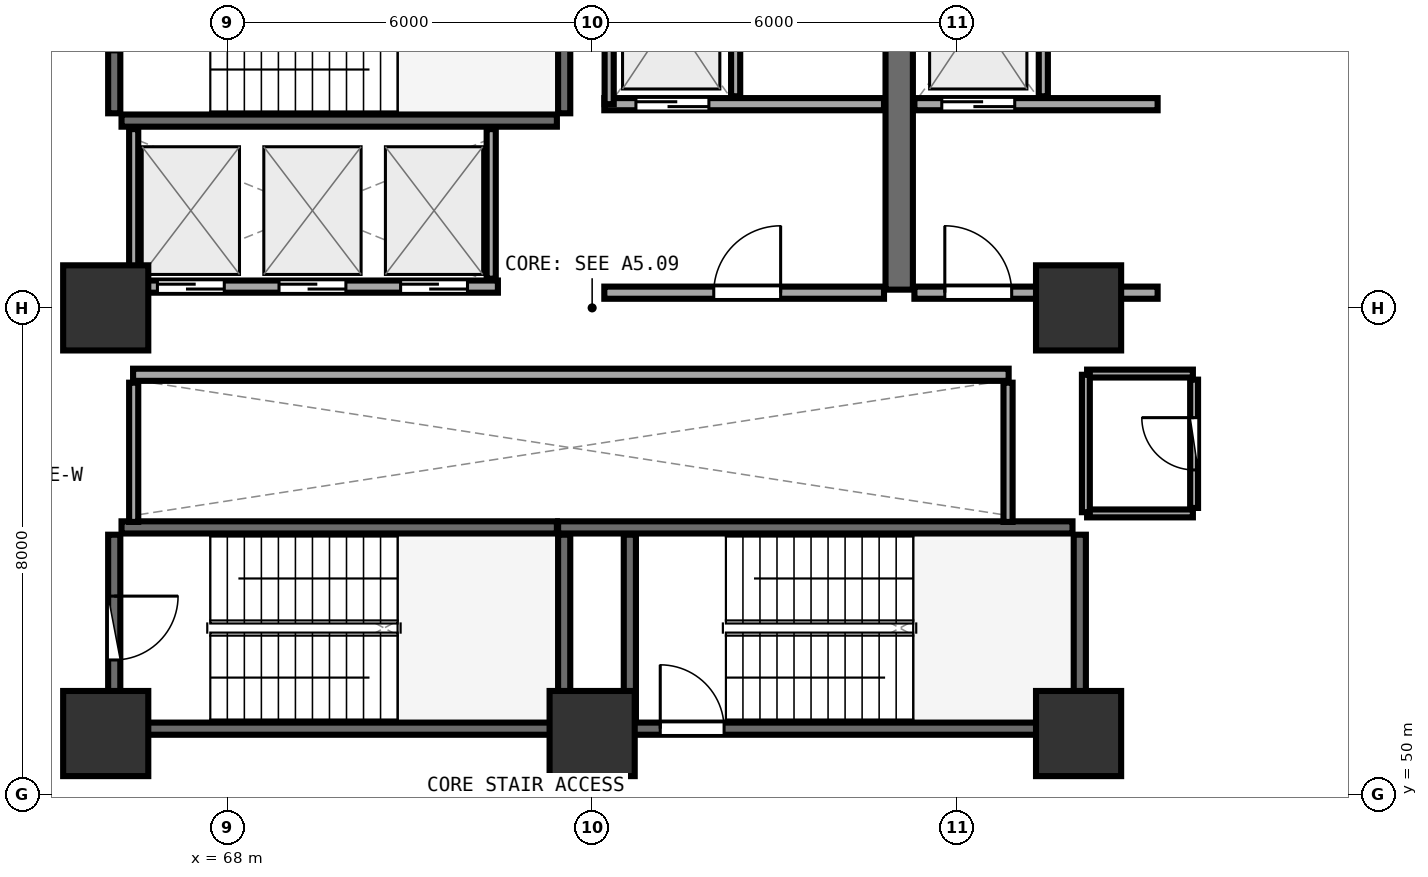
"""IFC4 building model, lengths in metres.
Left out: names, types, materials, properties, quantities, classifications, styles, units other than length and angle.
Written with IfcOpenShell. Run it as: python <this file> out.ifc"""

import sys

from ifc_helpers import new_model, si_unit, direction, frame, frame_2d, origin, origin_2d, place, context, subcontext, project, spatial, rectangle, extrude, element, fill, save


model = new_model("IFC4")
c1 = context("Model", 3, precision=1e-05, world=origin(), true_north=direction((0.0, 1.0)))
c2 = subcontext(c1, "Body", "Model", "MODEL_VIEW")
j1 = project(units=[si_unit("LENGTHUNIT", "METRE"), si_unit("PLANEANGLEUNIT", "RADIAN")], contexts=[c1])
p1 = place(None, origin())
s1 = spatial("IfcSite", under=j1, at=p1, CompositionType="ELEMENT")
p2 = place(p1, origin())
s2 = spatial("IfcBuilding", under=s1, at=p2, CompositionType="ELEMENT")
p3 = place(p2, frame((0.0, 0.0, 72.26)))
s3 = spatial("IfcBuildingStorey", under=s2, at=p3, CompositionType="ELEMENT", Elevation=72.26)
for number, where, z_axis, x_axis in (
    (1, (66.0, 51.0, 0.0), (0.0, 0.0, 1.0), (1.0, 0.0, 0.0)),
    (2, (74.0, 51.0, 0.0), (0.0, 0.0, 1.0), (1.0, 0.0, 0.0)),
    (3, (82.0, 51.0, 0.0), (0.0, 0.0, 1.0), (1.0, 0.0, 0.0)),
    (4, (82.0, 58.0, 0.0), (0.0, 0.0, 1.0), (1.0, 0.0, 0.0)),
    (5, (66.0, 58.0, 0.0), (0.0, 0.0, 1.0), (1.0, 0.0, 0.0)),
):
    element("IfcColumn", number, at=place(p3, frame(where, z_axis=z_axis, x_axis=x_axis)), inside=s3, PredefinedType="PILASTER", context=c2, shape_type="SweptSolid", body=[
        extrude(rectangle(XDim=1.4, YDim=1.4, at=origin_2d()), origin(), (0.0, 0.0, 1.0), 4.09),
    ])
p4 = place(p3, frame((66.26, 61.08, 0.0), z_axis=(0.0, 0.0, 1.0), x_axis=(1.0, 0.0, 0.0)))
e6 = element("IfcWall", 6, at=p4, inside=s3, PredefinedType="SHEAR", context=c2, shape_type="SweptSolid", body=[
    extrude(rectangle(XDim=7.16, YDim=0.2, at=frame_2d((3.58, 0.0))), origin(), (0.0, 0.0, 1.0), 3.83),
])
p5 = place(p3, frame((73.54, 61.2, 0.0), z_axis=(0.0, 0.0, 1.0), x_axis=(0.0, 1.0, 0.0)))
e7 = element("IfcWall", 7, at=p5, inside=s3, PredefinedType="SHEAR", context=c2, shape_type="SweptSolid", body=[
    extrude(rectangle(XDim=3.07, YDim=0.2, at=frame_2d((1.535, 0.0))), origin(), (0.0, 0.0, 1.0), 3.83),
])
p6 = place(p3, frame((66.14, 64.27, 0.0), z_axis=(0.0, 0.0, 1.0), x_axis=(0.0, -1.0, 0.0)))
e8 = element("IfcWall", 8, at=p6, inside=s3, PredefinedType="SHEAR", context=c2, shape_type="SweptSolid", body=[
    extrude(rectangle(XDim=3.07, YDim=0.2, at=frame_2d((1.535, 0.0))), origin(), (0.0, 0.0, 1.0), 3.83),
])
p7 = place(p6, frame((1.01, 0.0, 0.0)))
e9 = element("IfcOpeningElement", 9, at=p7, cuts=e8, PredefinedType="OPENING", context=c2, shape_type="SweptSolid", body=[
    extrude(rectangle(XDim=1.05, YDim=2.1, at=frame_2d((0.525, 1.05))), frame((0.0, 0.11, 0.0), z_axis=(0.0, -1.0, 0.0), x_axis=(1.0, 0.0, 0.0)), (0.0, 0.0, 1.0), 0.22),
])
p8 = place(p3, frame((74.0, 51.08, 0.0), z_axis=(0.0, 0.0, 1.0), x_axis=(1.0, 0.0, 0.0)))
e10 = element("IfcWall", 10, at=p8, inside=s3, PredefinedType="SHEAR", context=c2, shape_type="SweptSolid", body=[
    extrude(rectangle(XDim=7.9, YDim=0.2, at=frame_2d((3.95, 0.0))), origin(), (0.0, 0.0, 1.0), 3.83),
])
p9 = place(p8, frame((1.12, 0.0, 0.0)))
e11 = element("IfcOpeningElement", 11, at=p9, cuts=e10, PredefinedType="OPENING", context=c2, shape_type="SweptSolid", body=[
    extrude(rectangle(XDim=1.05, YDim=2.1, at=frame_2d((0.525, 1.05))), frame((0.0, 0.11, 0.0), z_axis=(0.0, -1.0, 0.0), x_axis=(1.0, 0.0, 0.0)), (0.0, 0.0, 1.0), 0.22),
])
p10 = place(p3, frame((82.02, 51.2, 0.0), z_axis=(0.0, 0.0, 1.0), x_axis=(0.0, 1.0, 0.0)))
e12 = element("IfcWall", 12, at=p10, inside=s3, PredefinedType="SHEAR", context=c2, shape_type="SweptSolid", body=[
    extrude(rectangle(XDim=3.07, YDim=0.2, at=frame_2d((1.535, 0.0))), origin(), (0.0, 0.0, 1.0), 3.83),
])
p11 = place(p3, frame((81.9, 54.39, 0.0), z_axis=(0.0, 0.0, 1.0), x_axis=(-1.0, 0.0, 0.0)))
e13 = element("IfcWall", 13, at=p11, inside=s3, PredefinedType="SHEAR", context=c2, shape_type="SweptSolid", body=[
    extrude(rectangle(XDim=8.46, YDim=0.2, at=frame_2d((4.23, 0.0))), origin(), (0.0, 0.0, 1.0), 3.83),
])
p12 = place(p3, frame((74.62, 54.27, 0.0), z_axis=(0.0, 0.0, 1.0), x_axis=(0.0, -1.0, 0.0)))
e14 = element("IfcWall", 14, at=p12, inside=s3, PredefinedType="SHEAR", context=c2, shape_type="SweptSolid", body=[
    extrude(rectangle(XDim=3.07, YDim=0.2, at=frame_2d((1.535, 0.0))), origin(), (0.0, 0.0, 1.0), 3.83),
])
p13 = place(p3, frame((66.26, 51.08, 0.0), z_axis=(0.0, 0.0, 1.0), x_axis=(1.0, 0.0, 0.0)))
e15 = element("IfcWall", 15, at=p13, inside=s3, PredefinedType="SHEAR", context=c2, shape_type="SweptSolid", body=[
    extrude(rectangle(XDim=7.16, YDim=0.2, at=frame_2d((3.58, 0.0))), origin(), (0.0, 0.0, 1.0), 3.83),
])
p14 = place(p3, frame((73.54, 51.2, 0.0), z_axis=(0.0, 0.0, 1.0), x_axis=(0.0, 1.0, 0.0)))
e16 = element("IfcWall", 16, at=p14, inside=s3, PredefinedType="SHEAR", context=c2, shape_type="SweptSolid", body=[
    extrude(rectangle(XDim=3.07, YDim=0.2, at=frame_2d((1.535, 0.0))), origin(), (0.0, 0.0, 1.0), 3.83),
])
p15 = place(p3, frame((73.42, 54.39, 0.0), z_axis=(0.0, 0.0, 1.0), x_axis=(-1.0, 0.0, 0.0)))
e17 = element("IfcWall", 17, at=p15, inside=s3, PredefinedType="SHEAR", context=c2, shape_type="SweptSolid", body=[
    extrude(rectangle(XDim=7.16, YDim=0.2, at=frame_2d((3.58, 0.0))), origin(), (0.0, 0.0, 1.0), 3.83),
])
p16 = place(p3, frame((66.14, 54.27, 0.0), z_axis=(0.0, 0.0, 1.0), x_axis=(0.0, -1.0, 0.0)))
e18 = element("IfcWall", 18, at=p16, inside=s3, PredefinedType="SHEAR", context=c2, shape_type="SweptSolid", body=[
    extrude(rectangle(XDim=3.07, YDim=0.2, at=frame_2d((1.535, 0.0))), origin(), (0.0, 0.0, 1.0), 3.83),
])
p17 = place(p16, frame((1.01, 0.0, 0.0)))
e19 = element("IfcOpeningElement", 19, at=p17, cuts=e18, PredefinedType="OPENING", context=c2, shape_type="SweptSolid", body=[
    extrude(rectangle(XDim=1.05, YDim=2.1, at=frame_2d((0.525, 1.05))), frame((0.0, 0.11, 0.0), z_axis=(0.0, -1.0, 0.0), x_axis=(1.0, 0.0, 0.0)), (0.0, 0.0, 1.0), 0.22),
])
p18 = place(p3, frame((79.05, 58.3, 0.0), z_axis=(0.0, 0.0, 1.0), x_axis=(0.0, 1.0, 0.0)))
e20 = element("IfcWall", 20, at=p18, inside=s3, PredefinedType="SHEAR", context=c2, shape_type="SweptSolid", body=[
    extrude(rectangle(XDim=6.3, YDim=0.45, at=frame_2d((3.15, 0.0))), origin(), (0.0, 0.0, 1.0), 3.83),
])
p19 = place(p3, frame((74.2, 61.35, 0.0), z_axis=(0.0, 0.0, 1.0), x_axis=(1.0, 0.0, 0.0)))
e21 = element("IfcWall", 21, at=p19, inside=s3, PredefinedType="SOLIDWALL", context=c2, shape_type="SweptSolid", body=[
    extrude(rectangle(XDim=4.6, YDim=0.2, at=frame_2d((2.3, 0.0))), origin(), (0.0, 0.0, 1.0), 3.82),
])
p20 = place(p19, frame((0.52, 0.0, 0.0)))
e22 = element("IfcOpeningElement", 22, at=p20, cuts=e21, PredefinedType="OPENING", context=c2, shape_type="SweptSolid", body=[
    extrude(rectangle(XDim=1.2, YDim=2.15, at=frame_2d((0.6, 1.075))), frame((0.0, 0.11, 0.0), z_axis=(0.0, -1.0, 0.0), x_axis=(1.0, 0.0, 0.0)), (0.0, 0.0, 1.0), 0.22),
])
p21 = place(p3, frame((74.28, 61.35, 0.0), z_axis=(0.0, 0.0, 1.0), x_axis=(0.0, 1.0, 0.0)))
e23 = element("IfcWall", 23, at=p21, inside=s3, PredefinedType="PARTITIONING", context=c2, shape_type="SweptSolid", body=[
    extrude(rectangle(XDim=2.97, YDim=0.15, at=frame_2d((1.485, 0.0))), origin(), (0.0, 0.0, 1.0), 3.82),
])
p22 = place(p3, frame((76.36, 61.48, 0.0), z_axis=(0.0, 0.0, 1.0), x_axis=(0.0, 1.0, 0.0)))
e24 = element("IfcWall", 24, at=p22, inside=s3, PredefinedType="PARTITIONING", context=c2, shape_type="SweptSolid", body=[
    extrude(rectangle(XDim=2.84, YDim=0.15, at=frame_2d((1.42, 0.0))), origin(), (0.0, 0.0, 1.0), 3.82),
])
p23 = place(p3, frame((79.3, 61.35, 0.0), z_axis=(0.0, 0.0, 1.0), x_axis=(1.0, 0.0, 0.0)))
e25 = element("IfcWall", 25, at=p23, inside=s3, PredefinedType="SOLIDWALL", context=c2, shape_type="SweptSolid", body=[
    extrude(rectangle(XDim=4.0, YDim=0.2, at=frame_2d((2.0, 0.0))), origin(), (0.0, 0.0, 1.0), 3.115),
])
p24 = place(p23, frame((0.45, 0.0, 0.0)))
e26 = element("IfcOpeningElement", 26, at=p24, cuts=e25, PredefinedType="OPENING", context=c2, shape_type="SweptSolid", body=[
    extrude(rectangle(XDim=1.2, YDim=2.15, at=frame_2d((0.6, 1.075))), frame((0.0, 0.11, 0.0), z_axis=(0.0, -1.0, 0.0), x_axis=(1.0, 0.0, 0.0)), (0.0, 0.0, 1.0), 0.22),
])
p25 = place(p3, frame((81.42, 61.48, 0.0), z_axis=(0.0, 0.0, 1.0), x_axis=(0.0, 1.0, 0.0)))
e27 = element("IfcWall", 27, at=p25, inside=s3, PredefinedType="PARTITIONING", context=c2, shape_type="SweptSolid", body=[
    extrude(rectangle(XDim=2.84, YDim=0.15, at=frame_2d((1.42, 0.0))), origin(), (0.0, 0.0, 1.0), 3.82),
])
p26 = place(p3, frame((74.2, 58.25, 0.0), z_axis=(0.0, 0.0, 1.0), x_axis=(1.0, 0.0, 0.0)))
e28 = element("IfcWall", 28, at=p26, inside=s3, PredefinedType="SOLIDWALL", context=c2, shape_type="SweptSolid", body=[
    extrude(rectangle(XDim=4.6, YDim=0.2, at=frame_2d((2.3, 0.0))), origin(), (0.0, 0.0, 1.0), 3.82),
])
p27 = place(p26, frame((1.8, 0.0, 0.0)))
e29 = element("IfcOpeningElement", 29, at=p27, cuts=e28, PredefinedType="OPENING", context=c2, shape_type="SweptSolid", body=[
    extrude(rectangle(XDim=1.1, YDim=2.1, at=frame_2d((0.55, 1.05))), frame((0.0, 0.11, 0.0), z_axis=(0.0, -1.0, 0.0), x_axis=(1.0, 0.0, 0.0)), (0.0, 0.0, 1.0), 0.22),
])
p28 = place(p3, frame((79.3, 58.25, 0.0), z_axis=(0.0, 0.0, 1.0), x_axis=(1.0, 0.0, 0.0)))
e30 = element("IfcWall", 30, at=p28, inside=s3, PredefinedType="SOLIDWALL", context=c2, shape_type="SweptSolid", body=[
    extrude(rectangle(XDim=4.0, YDim=0.2, at=frame_2d((2.0, 0.0))), origin(), (0.0, 0.0, 1.0), 3.115),
])
p29 = place(p28, frame((0.5, 0.0, 0.0)))
e31 = element("IfcOpeningElement", 31, at=p29, cuts=e30, PredefinedType="OPENING", context=c2, shape_type="SweptSolid", body=[
    extrude(rectangle(XDim=1.1, YDim=2.1, at=frame_2d((0.55, 1.05))), frame((0.0, 0.11, 0.0), z_axis=(0.0, -1.0, 0.0), x_axis=(1.0, 0.0, 0.0)), (0.0, 0.0, 1.0), 0.22),
])
p30 = place(p3, frame((66.45, 58.35, 0.0), z_axis=(0.0, 0.0, 1.0), x_axis=(1.0, 0.0, 0.0)))
e32 = element("IfcWall", 32, at=p30, inside=s3, PredefinedType="SOLIDWALL", context=c2, shape_type="SweptSolid", body=[
    extrude(rectangle(XDim=6.0, YDim=0.2, at=frame_2d((3.0, 0.0))), origin(), (0.0, 0.0, 1.0), 3.82),
])
p31 = place(p30, frame((0.4, 0.0, 0.0)))
e33 = element("IfcOpeningElement", 33, at=p31, cuts=e32, PredefinedType="OPENING", context=c2, shape_type="SweptSolid", body=[
    extrude(rectangle(XDim=1.1, YDim=2.1, at=frame_2d((0.55, 1.05))), frame((0.0, 0.11, 0.0), z_axis=(0.0, -1.0, 0.0), x_axis=(1.0, 0.0, 0.0)), (0.0, 0.0, 1.0), 0.22),
])
p32 = place(p30, frame((2.4, 0.0, 0.0)))
e34 = element("IfcOpeningElement", 34, at=p32, cuts=e32, PredefinedType="OPENING", context=c2, shape_type="SweptSolid", body=[
    extrude(rectangle(XDim=1.1, YDim=2.1, at=frame_2d((0.55, 1.05))), frame((0.0, 0.11, 0.0), z_axis=(0.0, -1.0, 0.0), x_axis=(1.0, 0.0, 0.0)), (0.0, 0.0, 1.0), 0.22),
])
p33 = place(p30, frame((4.4, 0.0, 0.0)))
e35 = element("IfcOpeningElement", 35, at=p33, cuts=e32, PredefinedType="OPENING", context=c2, shape_type="SweptSolid", body=[
    extrude(rectangle(XDim=1.1, YDim=2.1, at=frame_2d((0.55, 1.05))), frame((0.0, 0.11, 0.0), z_axis=(0.0, -1.0, 0.0), x_axis=(1.0, 0.0, 0.0)), (0.0, 0.0, 1.0), 0.22),
])
for number, where, z_axis, x_axis in (
    (36, (66.46, 58.48, 0.0), (0.0, 0.0, 1.0), (0.0, 1.0, 0.0)),
    (37, (72.34, 58.48, 0.0), (0.0, 0.0, 1.0), (0.0, 1.0, 0.0)),
):
    element("IfcWall", number, at=place(p3, frame(where, z_axis=z_axis, x_axis=x_axis)), inside=s3, PredefinedType="PARTITIONING", context=c2, shape_type="SweptSolid", body=[
        extrude(rectangle(XDim=2.46, YDim=0.15, at=frame_2d((1.23, 0.0))), origin(), (0.0, 0.0, 1.0), 3.82),
    ])
p34 = place(p3, frame((66.45, 56.9, 0.0), z_axis=(0.0, 0.0, 1.0), x_axis=(1.0, 0.0, 0.0)))
e38 = element("IfcWall", 38, at=p34, inside=s3, PredefinedType="SOLIDWALL", context=c2, shape_type="SweptSolid", body=[
    extrude(rectangle(XDim=14.4, YDim=0.2, at=frame_2d((7.2, 0.0))), origin(), (0.0, 0.0, 1.0), 3.82),
])
for number, where, z_axis, x_axis in (
    (39, (66.46, 54.48, 0.0), (0.0, 0.0, 1.0), (0.0, 1.0, 0.0)),
    (40, (80.84, 54.48, 0.0), (0.0, 0.0, 1.0), (0.0, 1.0, 0.0)),
):
    element("IfcWall", number, at=place(p3, frame(where, z_axis=z_axis, x_axis=x_axis)), inside=s3, PredefinedType="PARTITIONING", context=c2, shape_type="SweptSolid", body=[
        extrude(rectangle(XDim=2.29, YDim=0.15, at=frame_2d((1.145, 0.0))), origin(), (0.0, 0.0, 1.0), 3.82),
    ])
p35 = place(p3, frame((83.9, 54.71, 0.0), z_axis=(0.0, 0.0, 1.0), x_axis=(0.0, 1.0, 0.0)))
e41 = element("IfcWall", 41, at=p35, inside=s3, PredefinedType="PLUMBINGWALL", context=c2, shape_type="SweptSolid", body=[
    extrude(rectangle(XDim=2.11, YDim=0.13, at=frame_2d((1.055, 0.0))), origin(), (0.0, 0.0, 1.0), 3.82),
])
p36 = place(p35, frame((0.625, 0.0, 0.0)))
e42 = element("IfcOpeningElement", 42, at=p36, cuts=e41, PredefinedType="OPENING", context=c2, shape_type="SweptSolid", body=[
    extrude(rectangle(XDim=0.86, YDim=2.05, at=frame_2d((0.43, 1.025))), frame((0.0, 0.075, 0.0), z_axis=(0.0, -1.0, 0.0), x_axis=(1.0, 0.0, 0.0)), (0.0, 0.0, 1.0), 0.15),
])
for number, where, z_axis, x_axis in (
    (43, (82.14, 54.62, 0.0), (0.0, 0.0, 1.0), (1.0, 0.0, 0.0)),
    (44, (83.88, 56.92, 0.0), (0.0, 0.0, 1.0), (-1.0, 0.0, 0.0)),
):
    element("IfcWall", number, at=place(p3, frame(where, z_axis=z_axis, x_axis=x_axis)), inside=s3, PredefinedType="PLUMBINGWALL", context=c2, shape_type="SweptSolid", body=[
        extrude(rectangle(XDim=1.74, YDim=0.13, at=frame_2d((0.87, 0.0))), origin(), (0.0, 0.0, 1.0), 3.115),
    ])
p37 = place(p3, frame((82.12, 56.9, 0.0), z_axis=(0.0, 0.0, 1.0), x_axis=(0.0, -1.0, 0.0)))
e45 = element("IfcWall", 45, at=p37, inside=s3, PredefinedType="PLUMBINGWALL", context=c2, shape_type="SweptSolid", body=[
    extrude(rectangle(XDim=2.26, YDim=0.13, at=frame_2d((1.13, 0.0))), origin(), (0.0, 0.0, 1.0), 3.115),
])
p38 = place(p9, origin())
e46 = element("IfcDoor", 46, at=p38, inside=s3, OperationType="SINGLE_SWING_LEFT", PredefinedType="DOOR", context=c2, shape_type="SweptSolid", body=[
    extrude(rectangle(XDim=1.05, YDim=2.1, at=frame_2d((0.525, 1.05))), frame((0.0, 0.025, 0.0), z_axis=(0.0, -1.0, 0.0), x_axis=(1.0, 0.0, 0.0)), (0.0, 0.0, 1.0), 0.05),
])
fill(e11, e46)
p39 = place(p17, origin())
e47 = element("IfcDoor", 47, at=p39, inside=s3, OperationType="SINGLE_SWING_LEFT", PredefinedType="DOOR", context=c2, shape_type="SweptSolid", body=[
    extrude(rectangle(XDim=1.05, YDim=2.1, at=frame_2d((0.525, 1.05))), frame((0.0, 0.025, 0.0), z_axis=(0.0, -1.0, 0.0), x_axis=(1.0, 0.0, 0.0)), (0.0, 0.0, 1.0), 0.05),
])
fill(e19, e47)
p40 = place(p20, origin())
e48 = element("IfcDoor", 48, at=p40, inside=s3, OperationType="DOUBLE_DOOR_SLIDING", PredefinedType="DOOR", context=c2, shape_type="SweptSolid", body=[
    extrude(rectangle(XDim=1.2, YDim=2.15, at=frame_2d((0.6, 1.075))), frame((0.0, 0.025, 0.0), z_axis=(0.0, -1.0, 0.0), x_axis=(1.0, 0.0, 0.0)), (0.0, 0.0, 1.0), 0.05),
])
fill(e22, e48)
p41 = place(p24, origin())
e49 = element("IfcDoor", 49, at=p41, inside=s3, OperationType="DOUBLE_DOOR_SLIDING", PredefinedType="DOOR", context=c2, shape_type="SweptSolid", body=[
    extrude(rectangle(XDim=1.2, YDim=2.15, at=frame_2d((0.6, 1.075))), frame((0.0, 0.025, 0.0), z_axis=(0.0, -1.0, 0.0), x_axis=(1.0, 0.0, 0.0)), (0.0, 0.0, 1.0), 0.05),
])
fill(e26, e49)
p42 = place(p27, frame((1.1, 0.0, 0.0), z_axis=(0.0, 0.0, 1.0), x_axis=(-1.0, 0.0, 0.0)))
e50 = element("IfcDoor", 50, at=p42, inside=s3, OperationType="SINGLE_SWING_LEFT", PredefinedType="DOOR", context=c2, shape_type="SweptSolid", body=[
    extrude(rectangle(XDim=1.1, YDim=2.1, at=frame_2d((0.55, 1.05))), frame((0.0, 0.025, 0.0), z_axis=(0.0, -1.0, 0.0), x_axis=(1.0, 0.0, 0.0)), (0.0, 0.0, 1.0), 0.05),
])
fill(e29, e50)
p43 = place(p29, frame((1.1, 0.0, 0.0), z_axis=(0.0, 0.0, 1.0), x_axis=(-1.0, 0.0, 0.0)))
e51 = element("IfcDoor", 51, at=p43, inside=s3, OperationType="SINGLE_SWING_RIGHT", PredefinedType="DOOR", context=c2, shape_type="SweptSolid", body=[
    extrude(rectangle(XDim=1.1, YDim=2.1, at=frame_2d((0.55, 1.05))), frame((0.0, 0.025, 0.0), z_axis=(0.0, -1.0, 0.0), x_axis=(1.0, 0.0, 0.0)), (0.0, 0.0, 1.0), 0.05),
])
fill(e31, e51)
p44 = place(p31, origin())
e52 = element("IfcDoor", 52, at=p44, inside=s3, OperationType="DOUBLE_DOOR_SLIDING", PredefinedType="DOOR", context=c2, shape_type="SweptSolid", body=[
    extrude(rectangle(XDim=1.1, YDim=2.1, at=frame_2d((0.55, 1.05))), frame((0.0, 0.025, 0.0), z_axis=(0.0, -1.0, 0.0), x_axis=(1.0, 0.0, 0.0)), (0.0, 0.0, 1.0), 0.05),
])
fill(e33, e52)
p45 = place(p32, origin())
e53 = element("IfcDoor", 53, at=p45, inside=s3, OperationType="DOUBLE_DOOR_SLIDING", PredefinedType="DOOR", context=c2, shape_type="SweptSolid", body=[
    extrude(rectangle(XDim=1.1, YDim=2.1, at=frame_2d((0.55, 1.05))), frame((0.0, 0.025, 0.0), z_axis=(0.0, -1.0, 0.0), x_axis=(1.0, 0.0, 0.0)), (0.0, 0.0, 1.0), 0.05),
])
fill(e34, e53)
p46 = place(p33, origin())
e54 = element("IfcDoor", 54, at=p46, inside=s3, OperationType="DOUBLE_DOOR_SLIDING", PredefinedType="DOOR", context=c2, shape_type="SweptSolid", body=[
    extrude(rectangle(XDim=1.1, YDim=2.1, at=frame_2d((0.55, 1.05))), frame((0.0, 0.025, 0.0), z_axis=(0.0, -1.0, 0.0), x_axis=(1.0, 0.0, 0.0)), (0.0, 0.0, 1.0), 0.05),
])
fill(e35, e54)
p47 = place(p36, origin())
e55 = element("IfcDoor", 55, at=p47, inside=s3, OperationType="SINGLE_SWING_RIGHT", PredefinedType="DOOR", context=c2, shape_type="SweptSolid", body=[
    extrude(rectangle(XDim=0.86, YDim=2.05, at=frame_2d((0.43, 1.025))), frame((0.0, 0.025, 0.0), z_axis=(0.0, -1.0, 0.0), x_axis=(1.0, 0.0, 0.0)), (0.0, 0.0, 1.0), 0.05),
])
fill(e42, e55)
save(model, sys.argv[1])
